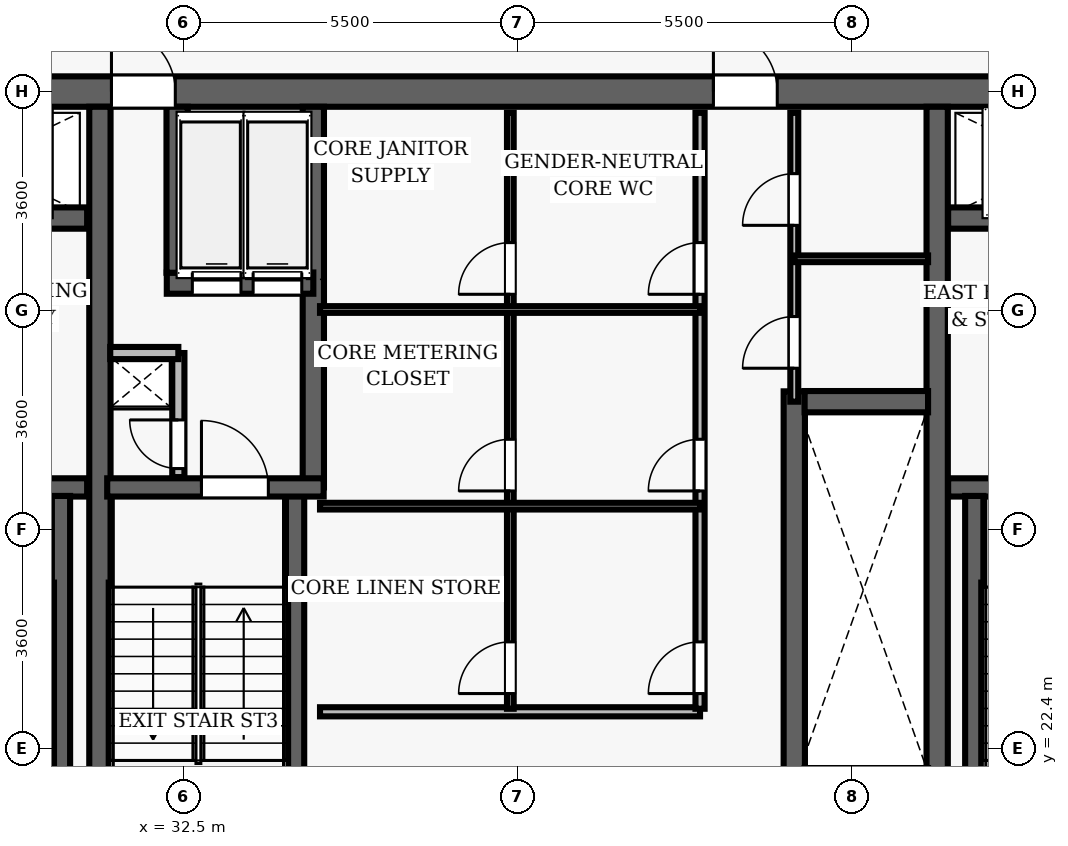
"""IFC4 building model, lengths in metres.
Left out: names, types, materials, properties, quantities, classifications, styles, units other than length and angle.
Written with IfcOpenShell. Run it as: python <this file> out.ifc"""

import sys

from ifc_helpers import new_model, si_unit, direction, frame, frame_2d, origin, place, context, subcontext, project, spatial, rectangle, extrude, element, fill, save


model = new_model("IFC4")
c1 = context("Model", 3, precision=1e-05, world=origin(), true_north=direction((0.0, 1.0)))
c2 = subcontext(c1, "Body", "Model", "MODEL_VIEW")
j1 = project(units=[si_unit("LENGTHUNIT", "METRE"), si_unit("PLANEANGLEUNIT", "RADIAN")], contexts=[c1])
p1 = place(None, origin())
s1 = spatial("IfcSite", under=j1, at=p1, CompositionType="ELEMENT")
p2 = place(p1, origin())
s2 = spatial("IfcBuilding", under=s1, at=p2, CompositionType="ELEMENT")
p3 = place(p2, frame((0.0, 0.0, 178.9)))
s3 = spatial("IfcBuildingStorey", under=s2, at=p3, CompositionType="ELEMENT", Elevation=178.9)
p4 = place(p3, frame((26.75, 33.2, 0.0), z_axis=(0.0, 0.0, 1.0), x_axis=(1.0, 0.0, 0.0)))
e1 = element("IfcWall", 1, at=p4, inside=s3, PredefinedType="SHEAR", context=c2, shape_type="SweptSolid", body=[
    extrude(rectangle(XDim=22.5, YDim=0.5, at=frame_2d((11.25, 0.0))), origin(), (0.0, 0.0, 1.0), 3.85),
])
p5 = place(p4, frame((4.57, 0.0, 0.0)))
e2 = element("IfcOpeningElement", 2, at=p5, cuts=e1, PredefinedType="OPENING", context=c2, shape_type="SweptSolid", body=[
    extrude(rectangle(XDim=1.05, YDim=2.15, at=frame_2d((0.525, 1.075))), frame((0.0, 0.26, 0.0), z_axis=(0.0, -1.0, 0.0), x_axis=(1.0, 0.0, 0.0)), (0.0, 0.0, 1.0), 0.52),
])
p6 = place(p4, frame((14.47, 0.0, 0.0)))
e3 = element("IfcOpeningElement", 3, at=p6, cuts=e1, PredefinedType="OPENING", context=c2, shape_type="SweptSolid", body=[
    extrude(rectangle(XDim=1.05, YDim=2.15, at=frame_2d((0.525, 1.075))), frame((0.0, 0.26, 0.0), z_axis=(0.0, -1.0, 0.0), x_axis=(1.0, 0.0, 0.0)), (0.0, 0.0, 1.0), 0.52),
])
for number, where, z_axis, x_axis in (
    (4, (31.13, 19.05, 0.0), (0.0, 0.0, 1.0), (0.0, 1.0, 0.0)),
    (5, (44.9, 19.05, 0.0), (0.0, 0.0, 1.0), (0.0, 1.0, 0.0)),
):
    element("IfcWall", number, at=place(p3, frame(where, z_axis=z_axis, x_axis=x_axis)), inside=s3, PredefinedType="SHEAR", context=c2, shape_type="SweptSolid", body=[
        extrude(rectangle(XDim=13.9, YDim=0.35, at=frame_2d((6.95, 0.0))), origin(), (0.0, 0.0, 1.0), 3.85),
    ])
p7 = place(p3, frame((27.25, 26.69, 0.0), z_axis=(0.0, 0.0, 1.0), x_axis=(1.0, 0.0, 0.0)))
e6 = element("IfcWall", 6, at=p7, inside=s3, PredefinedType="SHEAR", context=c2, shape_type="SweptSolid", body=[
    extrude(rectangle(XDim=3.67, YDim=0.3, at=frame_2d((1.835, 0.0))), origin(), (0.0, 0.0, 1.0), 3.85),
])
p8 = place(p7, frame((1.05, 0.0, 0.0)))
e7 = element("IfcOpeningElement", 7, at=p8, cuts=e6, PredefinedType="OPENING", context=c2, shape_type="SweptSolid", body=[
    extrude(rectangle(XDim=1.1, YDim=2.15, at=frame_2d((0.55, 1.075))), frame((0.0, 0.16, 0.0), z_axis=(0.0, -1.0, 0.0), x_axis=(1.0, 0.0, 0.0)), (0.0, 0.0, 1.0), 0.32),
])
p9 = place(p3, frame((30.49, 19.05, 0.0), z_axis=(0.0, 0.0, 1.0), x_axis=(0.0, 1.0, 0.0)))
e8 = element("IfcWall", 8, at=p9, inside=s3, PredefinedType="SHEAR", context=c2, shape_type="SweptSolid", body=[
    extrude(rectangle(XDim=7.5, YDim=0.3, at=frame_2d((3.75, 0.0))), origin(), (0.0, 0.0, 1.0), 3.85),
])
p10 = place(p3, frame((27.25, 31.12, 0.0), z_axis=(0.0, 0.0, 1.0), x_axis=(1.0, 0.0, 0.0)))
e9 = element("IfcWall", 9, at=p10, inside=s3, PredefinedType="SHEAR", context=c2, shape_type="SweptSolid", body=[
    extrude(rectangle(XDim=3.67, YDim=0.35, at=frame_2d((1.835, 0.0))), origin(), (0.0, 0.0, 1.0), 3.035),
])
p11 = place(p10, frame((1.25, 0.0, 0.0)))
e10 = element("IfcOpeningElement", 10, at=p11, cuts=e9, PredefinedType="OPENING", context=c2, shape_type="SweptSolid", body=[
    extrude(rectangle(XDim=1.1, YDim=2.15, at=frame_2d((0.55, 1.075))), frame((0.0, 0.185, 0.0), z_axis=(0.0, -1.0, 0.0), x_axis=(1.0, 0.0, 0.0)), (0.0, 0.0, 1.0), 0.37),
])
p12 = place(p3, frame((45.08, 26.69, 0.0), z_axis=(0.0, 0.0, 1.0), x_axis=(1.0, 0.0, 0.0)))
e11 = element("IfcWall", 11, at=p12, inside=s3, PredefinedType="SHEAR", context=c2, shape_type="SweptSolid", body=[
    extrude(rectangle(XDim=3.67, YDim=0.3, at=frame_2d((1.835, 0.0))), origin(), (0.0, 0.0, 1.0), 3.85),
])
p13 = place(p12, frame((1.05, 0.0, 0.0)))
e12 = element("IfcOpeningElement", 12, at=p13, cuts=e11, PredefinedType="OPENING", context=c2, shape_type="SweptSolid", body=[
    extrude(rectangle(XDim=1.1, YDim=2.15, at=frame_2d((0.55, 1.075))), frame((0.0, 0.16, 0.0), z_axis=(0.0, -1.0, 0.0), x_axis=(1.0, 0.0, 0.0)), (0.0, 0.0, 1.0), 0.32),
])
p14 = place(p3, frame((45.51, 19.05, 0.0), z_axis=(0.0, 0.0, 1.0), x_axis=(0.0, 1.0, 0.0)))
e13 = element("IfcWall", 13, at=p14, inside=s3, PredefinedType="SHEAR", context=c2, shape_type="SweptSolid", body=[
    extrude(rectangle(XDim=7.5, YDim=0.3, at=frame_2d((3.75, 0.0))), origin(), (0.0, 0.0, 1.0), 3.85),
])
p15 = place(p3, frame((45.08, 31.12, 0.0), z_axis=(0.0, 0.0, 1.0), x_axis=(1.0, 0.0, 0.0)))
e14 = element("IfcWall", 14, at=p15, inside=s3, PredefinedType="SHEAR", context=c2, shape_type="SweptSolid", body=[
    extrude(rectangle(XDim=3.67, YDim=0.35, at=frame_2d((1.835, 0.0))), origin(), (0.0, 0.0, 1.0), 3.035),
])
p16 = place(p15, frame((1.25, 0.0, 0.0)))
e15 = element("IfcOpeningElement", 15, at=p16, cuts=e14, PredefinedType="OPENING", context=c2, shape_type="SweptSolid", body=[
    extrude(rectangle(XDim=1.1, YDim=2.15, at=frame_2d((0.55, 1.075))), frame((0.0, 0.185, 0.0), z_axis=(0.0, -1.0, 0.0), x_axis=(1.0, 0.0, 0.0)), (0.0, 0.0, 1.0), 0.37),
])
p17 = place(p3, frame((34.34, 19.05, 0.0), z_axis=(0.0, 0.0, 1.0), x_axis=(0.0, 1.0, 0.0)))
e16 = element("IfcWall", 16, at=p17, inside=s3, PredefinedType="SHEAR", context=c2, shape_type="SweptSolid", body=[
    extrude(rectangle(XDim=7.5, YDim=0.3, at=frame_2d((3.75, 0.0))), origin(), (0.0, 0.0, 1.0), 3.85),
])
p18 = place(p3, frame((34.64, 26.69, 0.0), z_axis=(0.0, 0.0, 1.0), x_axis=(0.0, 1.0, 0.0)))
e17 = element("IfcWall", 17, at=p18, inside=s3, PredefinedType="SHEAR", context=c2, shape_type="SweptSolid", body=[
    extrude(rectangle(XDim=6.26, YDim=0.35, at=frame_2d((3.13, 0.0))), origin(), (0.0, 0.0, 1.0), 3.85),
])
p19 = place(p3, frame((31.25, 26.69, 0.0), z_axis=(0.0, 0.0, 1.0), x_axis=(1.0, 0.0, 0.0)))
e18 = element("IfcWall", 18, at=p19, inside=s3, PredefinedType="SHEAR", context=c2, shape_type="SweptSolid", body=[
    extrude(rectangle(XDim=3.56, YDim=0.3, at=frame_2d((1.78, 0.0))), origin(), (0.0, 0.0, 1.0), 3.85),
])
p20 = place(p19, frame((1.55, 0.0, 0.0)))
e19 = element("IfcOpeningElement", 19, at=p20, cuts=e18, PredefinedType="OPENING", context=c2, shape_type="SweptSolid", body=[
    extrude(rectangle(XDim=1.1, YDim=2.15, at=frame_2d((0.55, 1.075))), frame((0.0, 0.16, 0.0), z_axis=(0.0, -1.0, 0.0), x_axis=(1.0, 0.0, 0.0)), (0.0, 0.0, 1.0), 0.32),
])
p21 = place(p3, frame((32.23, 30.05, 0.0), z_axis=(0.0, 0.0, 1.0), x_axis=(1.0, 0.0, 0.0)))
e20 = element("IfcWall", 20, at=p21, inside=s3, PredefinedType="SHEAR", context=c2, shape_type="SweptSolid", body=[
    extrude(rectangle(XDim=2.41, YDim=0.35, at=frame_2d((1.205, 0.0))), origin(), (0.0, 0.0, 1.0), 3.035),
])
p22 = place(p21, frame((0.42, 0.0, 0.0)))
e21 = element("IfcOpeningElement", 21, at=p22, cuts=e20, PredefinedType="OPENING", context=c2, shape_type="SweptSolid", body=[
    extrude(rectangle(XDim=0.8, YDim=2.15, at=frame_2d((0.4, 1.075))), frame((0.0, 0.185, 0.0), z_axis=(0.0, -1.0, 0.0), x_axis=(1.0, 0.0, 0.0)), (0.0, 0.0, 1.0), 0.37),
])
p23 = place(p21, frame((1.42, 0.0, 0.0)))
e22 = element("IfcOpeningElement", 22, at=p23, cuts=e20, PredefinedType="OPENING", context=c2, shape_type="SweptSolid", body=[
    extrude(rectangle(XDim=0.8, YDim=2.15, at=frame_2d((0.4, 1.075))), frame((0.0, 0.185, 0.0), z_axis=(0.0, -1.0, 0.0), x_axis=(1.0, 0.0, 0.0)), (0.0, 0.0, 1.0), 0.37),
])
p24 = place(p3, frame((32.4, 30.22, 0.0), z_axis=(0.0, 0.0, 1.0), x_axis=(0.0, 1.0, 0.0)))
e23 = element("IfcWall", 23, at=p24, inside=s3, PredefinedType="SHEAR", context=c2, shape_type="SweptSolid", body=[
    extrude(rectangle(XDim=2.73, YDim=0.35, at=frame_2d((1.365, 0.0))), origin(), (0.0, 0.0, 1.0), 3.035),
])
p25 = place(p3, frame((32.42, 26.86, 0.0), z_axis=(0.0, 0.0, 1.0), x_axis=(0.0, 1.0, 0.0)))
e24 = element("IfcWall", 24, at=p25, inside=s3, PredefinedType="PARTITIONING", context=c2, shape_type="SweptSolid", body=[
    extrude(rectangle(XDim=2.04, YDim=0.2, at=frame_2d((1.02, 0.0))), origin(), (0.0, 0.0, 1.0), 3.035),
])
p26 = place(p25, frame((0.14, 0.0, 0.0)))
e25 = element("IfcOpeningElement", 25, at=p26, cuts=e24, PredefinedType="OPENING", context=c2, shape_type="SweptSolid", body=[
    extrude(rectangle(XDim=0.8, YDim=2.05, at=frame_2d((0.4, 1.025))), frame((0.0, 0.11, 0.0), z_axis=(0.0, -1.0, 0.0), x_axis=(1.0, 0.0, 0.0)), (0.0, 0.0, 1.0), 0.22),
])
p27 = place(p3, frame((31.3, 28.9, 0.0), z_axis=(0.0, 0.0, 1.0), x_axis=(1.0, 0.0, 0.0)))
e26 = element("IfcWall", 26, at=p27, inside=s3, PredefinedType="PARTITIONING", context=c2, shape_type="SweptSolid", body=[
    extrude(rectangle(XDim=1.12, YDim=0.2, at=frame_2d((0.56, 0.0))), origin(), (0.0, 0.0, 1.0), 3.035),
])
p28 = place(p3, frame((42.55, 21.73, 0.0), z_axis=(0.0, 0.0, 1.0), x_axis=(0.0, 1.0, 0.0)))
e27 = element("IfcWall", 27, at=p28, inside=s3, PredefinedType="SHEAR", context=c2, shape_type="SweptSolid", body=[
    extrude(rectangle(XDim=6.54, YDim=0.35, at=frame_2d((3.27, 0.0))), origin(), (0.0, 0.0, 1.0), 3.035),
])
p29 = place(p3, frame((42.72, 28.1, 0.0), z_axis=(0.0, 0.0, 1.0), x_axis=(1.0, 0.0, 0.0)))
e28 = element("IfcWall", 28, at=p29, inside=s3, PredefinedType="SHEAR", context=c2, shape_type="SweptSolid", body=[
    extrude(rectangle(XDim=2.03, YDim=0.35, at=frame_2d((1.015, 0.0))), origin(), (0.0, 0.0, 1.0), 3.035),
])
p30 = place(p3, frame((34.75, 23.0, 0.0), z_axis=(0.0, 0.0, 1.0), x_axis=(1.0, 0.0, 0.0)))
e29 = element("IfcWall", 29, at=p30, inside=s3, PredefinedType="PARTITIONING", context=c2, shape_type="SweptSolid", body=[
    extrude(rectangle(XDim=6.25, YDim=0.15, at=frame_2d((3.125, 0.0))), origin(), (0.0, 0.0, 1.0), 3.035),
])
p31 = place(p3, frame((41.0, 23.05, 0.0), z_axis=(0.0, 0.0, 1.0), x_axis=(0.0, 1.0, 0.0)))
e30 = element("IfcWall", 30, at=p31, inside=s3, PredefinedType="PARTITIONING", context=c2, shape_type="SweptSolid", body=[
    extrude(rectangle(XDim=9.8, YDim=0.15, at=frame_2d((4.9, 0.0))), origin(), (0.0, 0.0, 1.0), 3.035),
])
p32 = place(p31, frame((0.25, 0.0, 0.0)))
e31 = element("IfcOpeningElement", 31, at=p32, cuts=e30, PredefinedType="OPENING", context=c2, shape_type="SweptSolid", body=[
    extrude(rectangle(XDim=0.85, YDim=2.1, at=frame_2d((0.425, 1.05))), frame((0.0, 0.085, 0.0), z_axis=(0.0, -1.0, 0.0), x_axis=(1.0, 0.0, 0.0)), (0.0, 0.0, 1.0), 0.17),
])
p33 = place(p31, frame((3.582, 0.0, 0.0)))
e32 = element("IfcOpeningElement", 32, at=p33, cuts=e30, PredefinedType="OPENING", context=c2, shape_type="SweptSolid", body=[
    extrude(rectangle(XDim=0.85, YDim=2.1, at=frame_2d((0.425, 1.05))), frame((0.0, 0.085, 0.0), z_axis=(0.0, -1.0, 0.0), x_axis=(1.0, 0.0, 0.0)), (0.0, 0.0, 1.0), 0.17),
])
p34 = place(p31, frame((6.816, 0.0, 0.0)))
e33 = element("IfcOpeningElement", 33, at=p34, cuts=e30, PredefinedType="OPENING", context=c2, shape_type="SweptSolid", body=[
    extrude(rectangle(XDim=0.85, YDim=2.1, at=frame_2d((0.425, 1.05))), frame((0.0, 0.085, 0.0), z_axis=(0.0, -1.0, 0.0), x_axis=(1.0, 0.0, 0.0)), (0.0, 0.0, 1.0), 0.17),
])
p35 = place(p3, frame((37.88, 23.05, 0.0), z_axis=(0.0, 0.0, 1.0), x_axis=(0.0, 1.0, 0.0)))
e34 = element("IfcWall", 34, at=p35, inside=s3, PredefinedType="PARTITIONING", context=c2, shape_type="SweptSolid", body=[
    extrude(rectangle(XDim=9.8, YDim=0.11, at=frame_2d((4.9, 0.0))), origin(), (0.0, 0.0, 1.0), 3.035),
])
p36 = place(p35, frame((0.25, 0.0, 0.0)))
e35 = element("IfcOpeningElement", 35, at=p36, cuts=e34, PredefinedType="OPENING", context=c2, shape_type="SweptSolid", body=[
    extrude(rectangle(XDim=0.85, YDim=2.1, at=frame_2d((0.425, 1.05))), frame((0.0, 0.065, 0.0), z_axis=(0.0, -1.0, 0.0), x_axis=(1.0, 0.0, 0.0)), (0.0, 0.0, 1.0), 0.13),
])
p37 = place(p35, frame((3.582, 0.0, 0.0)))
e36 = element("IfcOpeningElement", 36, at=p37, cuts=e34, PredefinedType="OPENING", context=c2, shape_type="SweptSolid", body=[
    extrude(rectangle(XDim=0.85, YDim=2.1, at=frame_2d((0.425, 1.05))), frame((0.0, 0.065, 0.0), z_axis=(0.0, -1.0, 0.0), x_axis=(1.0, 0.0, 0.0)), (0.0, 0.0, 1.0), 0.13),
])
p38 = place(p35, frame((6.816, 0.0, 0.0)))
e37 = element("IfcOpeningElement", 37, at=p38, cuts=e34, PredefinedType="OPENING", context=c2, shape_type="SweptSolid", body=[
    extrude(rectangle(XDim=0.85, YDim=2.1, at=frame_2d((0.425, 1.05))), frame((0.0, 0.065, 0.0), z_axis=(0.0, -1.0, 0.0), x_axis=(1.0, 0.0, 0.0)), (0.0, 0.0, 1.0), 0.13),
])
for number, where, z_axis, x_axis in (
    (38, (34.75, 26.382, 0.0), (0.0, 0.0, 1.0), (1.0, 0.0, 0.0)),
    (39, (34.75, 29.616, 0.0), (0.0, 0.0, 1.0), (1.0, 0.0, 0.0)),
):
    element("IfcWall", number, at=place(p3, frame(where, z_axis=z_axis, x_axis=x_axis)), inside=s3, PredefinedType="PARTITIONING", context=c2, shape_type="SweptSolid", body=[
        extrude(rectangle(XDim=6.25, YDim=0.11, at=frame_2d((3.125, 0.0))), origin(), (0.0, 0.0, 1.0), 3.035),
    ])
p39 = place(p3, frame((42.55, 28.1, 0.0), z_axis=(0.0, 0.0, 1.0), x_axis=(0.0, 1.0, 0.0)))
e40 = element("IfcWall", 40, at=p39, inside=s3, PredefinedType="PARTITIONING", context=c2, shape_type="SweptSolid", body=[
    extrude(rectangle(XDim=4.75, YDim=0.13, at=frame_2d((2.375, 0.0))), origin(), (0.0, 0.0, 1.0), 3.035),
])
p40 = place(p39, frame((0.55, 0.0, 0.0)))
e41 = element("IfcOpeningElement", 41, at=p40, cuts=e40, PredefinedType="OPENING", context=c2, shape_type="SweptSolid", body=[
    extrude(rectangle(XDim=0.85, YDim=2.1, at=frame_2d((0.425, 1.05))), frame((0.0, 0.075, 0.0), z_axis=(0.0, -1.0, 0.0), x_axis=(1.0, 0.0, 0.0)), (0.0, 0.0, 1.0), 0.15),
])
p41 = place(p39, frame((2.9, 0.0, 0.0)))
e42 = element("IfcOpeningElement", 42, at=p41, cuts=e40, PredefinedType="OPENING", context=c2, shape_type="SweptSolid", body=[
    extrude(rectangle(XDim=0.85, YDim=2.1, at=frame_2d((0.425, 1.05))), frame((0.0, 0.075, 0.0), z_axis=(0.0, -1.0, 0.0), x_axis=(1.0, 0.0, 0.0)), (0.0, 0.0, 1.0), 0.15),
])
p42 = place(p3, frame((42.55, 30.45, 0.0), z_axis=(0.0, 0.0, 1.0), x_axis=(1.0, 0.0, 0.0)))
e43 = element("IfcWall", 43, at=p42, inside=s3, PredefinedType="PARTITIONING", context=c2, shape_type="SweptSolid", body=[
    extrude(rectangle(XDim=2.2, YDim=0.11, at=frame_2d((1.1, 0.0))), origin(), (0.0, 0.0, 1.0), 3.035),
])
p43 = place(p20, origin())
e44 = element("IfcDoor", 44, at=p43, inside=s3, OperationType="SINGLE_SWING_LEFT", PredefinedType="DOOR", context=c2, shape_type="SweptSolid", body=[
    extrude(rectangle(XDim=1.1, YDim=2.15, at=frame_2d((0.55, 1.075))), frame((0.0, 0.025, 0.0), z_axis=(0.0, -1.0, 0.0), x_axis=(1.0, 0.0, 0.0)), (0.0, 0.0, 1.0), 0.05),
])
fill(e19, e44)
p44 = place(p26, origin())
e45 = element("IfcDoor", 45, at=p44, inside=s3, OperationType="SINGLE_SWING_RIGHT", PredefinedType="DOOR", context=c2, shape_type="SweptSolid", body=[
    extrude(rectangle(XDim=0.8, YDim=2.05, at=frame_2d((0.4, 1.025))), frame((0.0, 0.025, 0.0), z_axis=(0.0, -1.0, 0.0), x_axis=(1.0, 0.0, 0.0)), (0.0, 0.0, 1.0), 0.05),
])
fill(e25, e45)
p45 = place(p5, origin())
e46 = element("IfcDoor", 46, at=p45, inside=s3, OperationType="SINGLE_SWING_LEFT", PredefinedType="DOOR", context=c2, shape_type="SweptSolid", body=[
    extrude(rectangle(XDim=1.05, YDim=2.15, at=frame_2d((0.525, 1.075))), frame((0.0, 0.025, 0.0), z_axis=(0.0, -1.0, 0.0), x_axis=(1.0, 0.0, 0.0)), (0.0, 0.0, 1.0), 0.05),
])
fill(e2, e46)
p46 = place(p6, origin())
e47 = element("IfcDoor", 47, at=p46, inside=s3, OperationType="SINGLE_SWING_LEFT", PredefinedType="DOOR", context=c2, shape_type="SweptSolid", body=[
    extrude(rectangle(XDim=1.05, YDim=2.15, at=frame_2d((0.525, 1.075))), frame((0.0, 0.025, 0.0), z_axis=(0.0, -1.0, 0.0), x_axis=(1.0, 0.0, 0.0)), (0.0, 0.0, 1.0), 0.05),
])
fill(e3, e47)
p47 = place(p32, origin())
e48 = element("IfcDoor", 48, at=p47, inside=s3, OperationType="SINGLE_SWING_LEFT", PredefinedType="DOOR", context=c2, shape_type="SweptSolid", body=[
    extrude(rectangle(XDim=0.85, YDim=2.1, at=frame_2d((0.425, 1.05))), frame((0.0, 0.025, 0.0), z_axis=(0.0, -1.0, 0.0), x_axis=(1.0, 0.0, 0.0)), (0.0, 0.0, 1.0), 0.05),
])
fill(e31, e48)
p48 = place(p36, origin())
e49 = element("IfcDoor", 49, at=p48, inside=s3, OperationType="SINGLE_SWING_LEFT", PredefinedType="DOOR", context=c2, shape_type="SweptSolid", body=[
    extrude(rectangle(XDim=0.85, YDim=2.1, at=frame_2d((0.425, 1.05))), frame((0.0, 0.025, 0.0), z_axis=(0.0, -1.0, 0.0), x_axis=(1.0, 0.0, 0.0)), (0.0, 0.0, 1.0), 0.05),
])
fill(e35, e49)
p49 = place(p33, origin())
e50 = element("IfcDoor", 50, at=p49, inside=s3, OperationType="SINGLE_SWING_LEFT", PredefinedType="DOOR", context=c2, shape_type="SweptSolid", body=[
    extrude(rectangle(XDim=0.85, YDim=2.1, at=frame_2d((0.425, 1.05))), frame((0.0, 0.025, 0.0), z_axis=(0.0, -1.0, 0.0), x_axis=(1.0, 0.0, 0.0)), (0.0, 0.0, 1.0), 0.05),
])
fill(e32, e50)
p50 = place(p37, origin())
e51 = element("IfcDoor", 51, at=p50, inside=s3, OperationType="SINGLE_SWING_LEFT", PredefinedType="DOOR", context=c2, shape_type="SweptSolid", body=[
    extrude(rectangle(XDim=0.85, YDim=2.1, at=frame_2d((0.425, 1.05))), frame((0.0, 0.025, 0.0), z_axis=(0.0, -1.0, 0.0), x_axis=(1.0, 0.0, 0.0)), (0.0, 0.0, 1.0), 0.05),
])
fill(e36, e51)
p51 = place(p34, origin())
e52 = element("IfcDoor", 52, at=p51, inside=s3, OperationType="SINGLE_SWING_LEFT", PredefinedType="DOOR", context=c2, shape_type="SweptSolid", body=[
    extrude(rectangle(XDim=0.85, YDim=2.1, at=frame_2d((0.425, 1.05))), frame((0.0, 0.025, 0.0), z_axis=(0.0, -1.0, 0.0), x_axis=(1.0, 0.0, 0.0)), (0.0, 0.0, 1.0), 0.05),
])
fill(e33, e52)
p52 = place(p38, origin())
e53 = element("IfcDoor", 53, at=p52, inside=s3, OperationType="SINGLE_SWING_LEFT", PredefinedType="DOOR", context=c2, shape_type="SweptSolid", body=[
    extrude(rectangle(XDim=0.85, YDim=2.1, at=frame_2d((0.425, 1.05))), frame((0.0, 0.025, 0.0), z_axis=(0.0, -1.0, 0.0), x_axis=(1.0, 0.0, 0.0)), (0.0, 0.0, 1.0), 0.05),
])
fill(e37, e53)
p53 = place(p40, origin())
e54 = element("IfcDoor", 54, at=p53, inside=s3, OperationType="SINGLE_SWING_LEFT", PredefinedType="DOOR", context=c2, shape_type="SweptSolid", body=[
    extrude(rectangle(XDim=0.85, YDim=2.1, at=frame_2d((0.425, 1.05))), frame((0.0, 0.025, 0.0), z_axis=(0.0, -1.0, 0.0), x_axis=(1.0, 0.0, 0.0)), (0.0, 0.0, 1.0), 0.05),
])
fill(e41, e54)
p54 = place(p41, origin())
e55 = element("IfcDoor", 55, at=p54, inside=s3, OperationType="SINGLE_SWING_LEFT", PredefinedType="DOOR", context=c2, shape_type="SweptSolid", body=[
    extrude(rectangle(XDim=0.85, YDim=2.1, at=frame_2d((0.425, 1.05))), frame((0.0, 0.025, 0.0), z_axis=(0.0, -1.0, 0.0), x_axis=(1.0, 0.0, 0.0)), (0.0, 0.0, 1.0), 0.05),
])
fill(e42, e55)
p55 = place(p22, origin())
e56 = element("IfcDoor", 56, at=p55, inside=s3, OperationType="SLIDING_TO_LEFT", PredefinedType="DOOR", context=c2, shape_type="SweptSolid", body=[
    extrude(rectangle(XDim=0.8, YDim=2.15, at=frame_2d((0.4, 1.075))), frame((0.0, 0.025, 0.0), z_axis=(0.0, -1.0, 0.0), x_axis=(1.0, 0.0, 0.0)), (0.0, 0.0, 1.0), 0.05),
])
fill(e21, e56)
p56 = place(p23, origin())
e57 = element("IfcDoor", 57, at=p56, inside=s3, OperationType="SLIDING_TO_LEFT", PredefinedType="DOOR", context=c2, shape_type="SweptSolid", body=[
    extrude(rectangle(XDim=0.8, YDim=2.15, at=frame_2d((0.4, 1.075))), frame((0.0, 0.025, 0.0), z_axis=(0.0, -1.0, 0.0), x_axis=(1.0, 0.0, 0.0)), (0.0, 0.0, 1.0), 0.05),
])
fill(e22, e57)
save(model, sys.argv[1])
